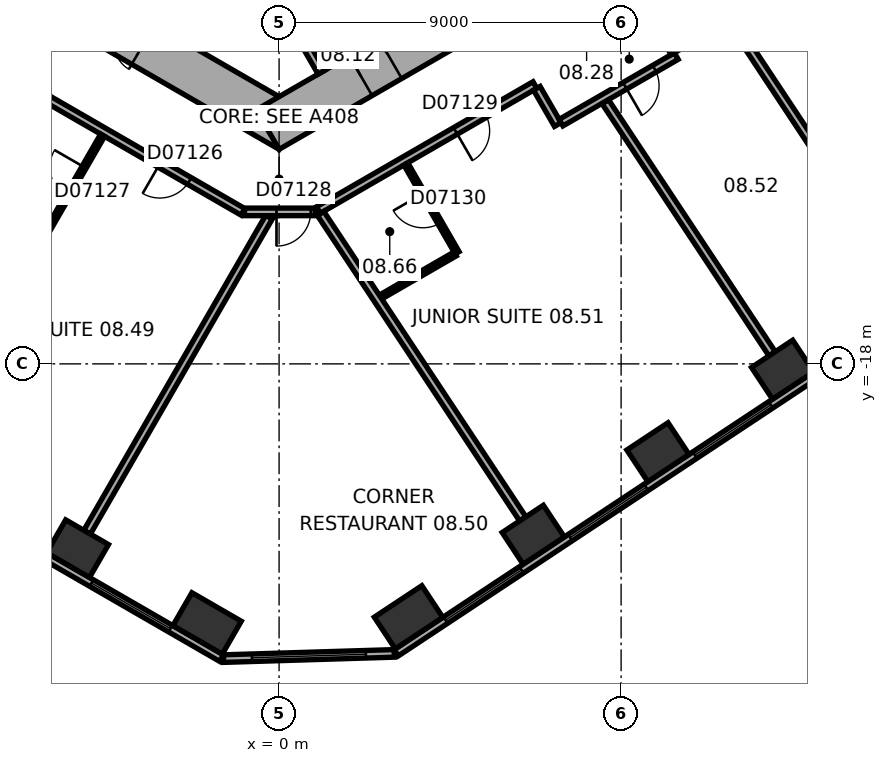
"""IFC4 building model, lengths in metres.
Left out: names, types, materials, properties, quantities, classifications, styles, units other than length and angle.
Written with IfcOpenShell. Run it as: python <this file> out.ifc"""

import sys

from ifc_helpers import new_model, si_unit, direction, frame, frame_2d, origin, origin_2d, place, context, subcontext, project, spatial, rectangle, extrude, element, fill, save


model = new_model("IFC4")
c1 = context("Model", 3, precision=1e-05, world=origin(), true_north=direction((0.0, 1.0)))
c2 = subcontext(c1, "Body", "Model", "MODEL_VIEW")
j1 = project(units=[si_unit("LENGTHUNIT", "METRE"), si_unit("PLANEANGLEUNIT", "RADIAN")], contexts=[c1])
p1 = place(None, origin())
s1 = spatial("IfcSite", under=j1, at=p1, CompositionType="ELEMENT")
p2 = place(p1, origin())
s2 = spatial("IfcBuilding", under=s1, at=p2, CompositionType="ELEMENT")
p3 = place(p2, frame((0.0, 0.0, 47.3)))
s3 = spatial("IfcBuildingStorey", under=s2, at=p3, CompositionType="ELEMENT", Elevation=47.3)
p4 = place(p3, frame((-5.302, -22.862, 0.0), z_axis=(0.0, 0.0, 1.0), x_axis=(0.866025403784, -0.5, 0.0)))
e1 = element("IfcColumn", 1, at=p4, inside=s3, PredefinedType="COLUMN", context=c2, shape_type="SweptSolid", body=[
    extrude(rectangle(XDim=1.3, YDim=1.0, at=origin_2d()), origin(), (0.0, 0.0, 1.0), 3.3),
])
for number, where, z_axis, x_axis in (
    (2, (-1.895, -24.829, 0.0), (0.0, 0.0, 1.0), (0.866, -0.5, 0.0)),
    (3, (3.407, -24.667, 0.0), (0.0, 0.0, 1.0), (0.834, 0.552, 0.0)),
):
    element("IfcColumn", number, at=place(p3, frame(where, z_axis=z_axis, x_axis=x_axis)), inside=s3, PredefinedType="COLUMN", context=c2, shape_type="SweptSolid", body=[
        extrude(rectangle(XDim=1.5, YDim=1.0, at=origin_2d()), origin(), (0.0, 0.0, 1.0), 3.3),
    ])
for number, where, z_axis, x_axis in (
    (4, (6.688, -22.496, 0.0), (0.0, 0.0, 1.0), (0.834, 0.552, 0.0)),
    (5, (9.969, -20.324, 0.0), (0.0, 0.0, 1.0), (0.834, 0.552, 0.0)),
    (6, (13.25, -18.152, 0.0), (0.0, 0.0, 1.0), (0.834, 0.552, 0.0)),
):
    element("IfcColumn", number, at=place(p3, frame(where, z_axis=z_axis, x_axis=x_axis)), inside=s3, PredefinedType="COLUMN", context=c2, shape_type="SweptSolid", body=[
        extrude(rectangle(XDim=1.3, YDim=1.0, at=origin_2d()), origin(), (0.0, 0.0, 1.0), 3.3),
    ])
p5 = place(p3, frame((-10.4, -5.658, 0.0), z_axis=(0.0, 0.0, 1.0), x_axis=(0.866021384402, -0.500006961711, 0.0)))
e7 = element("IfcWall", 7, at=p5, inside=s3, PredefinedType="SHEAR", context=c2, shape_type="SweptSolid", body=[
    extrude(rectangle(XDim=12.355, YDim=1.2, at=frame_2d((6.178, 0.0))), origin(), (0.0, 0.0, 1.0), 3.3),
])
p6 = place(p5, frame((6.378, 0.0, 0.0)))
e8 = element("IfcOpeningElement", 8, at=p6, cuts=e7, PredefinedType="OPENING", context=c2, shape_type="SweptSolid", body=[
    extrude(rectangle(XDim=1.5, YDim=2.1, at=frame_2d((0.75, 1.05))), frame((0.0, 0.61, 0.0), z_axis=(0.0, -1.0, 0.0), x_axis=(1.0, 0.0, 0.0)), (0.0, 0.0, 1.0), 1.22),
])
p7 = place(p5, frame((3.228, 0.0, 0.0)))
e9 = element("IfcOpeningElement", 9, at=p7, cuts=e7, PredefinedType="OPENING", context=c2, shape_type="SweptSolid", body=[
    extrude(rectangle(XDim=0.9, YDim=2.1, at=frame_2d((0.45, 1.05))), frame((0.0, 0.61, 0.0), z_axis=(0.0, -1.0, 0.0), x_axis=(1.0, 0.0, 0.0)), (0.0, 0.0, 1.0), 1.22),
])
p8 = place(p3, frame((-0.3, -11.836, 0.0), z_axis=(0.0, 0.0, 1.0), x_axis=(0.866021384402, 0.500006961711, 0.0)))
e10 = element("IfcWall", 10, at=p8, inside=s3, PredefinedType="SHEAR", context=c2, shape_type="SweptSolid", body=[
    extrude(rectangle(XDim=12.355, YDim=1.2, at=frame_2d((6.178, 0.0))), origin(), (0.0, 0.0, 1.0), 3.3),
])
p9 = place(p8, frame((2.828, 0.0, 0.0)))
e11 = element("IfcOpeningElement", 11, at=p9, cuts=e10, PredefinedType="OPENING", context=c2, shape_type="SweptSolid", body=[
    extrude(rectangle(XDim=0.9, YDim=2.1, at=frame_2d((0.45, 1.05))), frame((0.0, 0.61, 0.0), z_axis=(0.0, -1.0, 0.0), x_axis=(1.0, 0.0, 0.0)), (0.0, 0.0, 1.0), 1.22),
])
p10 = place(p8, frame((5.428, 0.0, 0.0)))
e12 = element("IfcOpeningElement", 12, at=p10, cuts=e10, PredefinedType="OPENING", context=c2, shape_type="SweptSolid", body=[
    extrude(rectangle(XDim=0.9, YDim=2.1, at=frame_2d((0.45, 1.05))), frame((0.0, 0.61, 0.0), z_axis=(0.0, -1.0, 0.0), x_axis=(1.0, 0.0, 0.0)), (0.0, 0.0, 1.0), 1.22),
])
p11 = place(p8, frame((7.928, 0.0, 0.0)))
e13 = element("IfcOpeningElement", 13, at=p11, cuts=e10, PredefinedType="OPENING", context=c2, shape_type="SweptSolid", body=[
    extrude(rectangle(XDim=1.1, YDim=2.1, at=frame_2d((0.55, 1.05))), frame((0.0, 0.61, 0.0), z_axis=(0.0, -1.0, 0.0), x_axis=(1.0, 0.0, 0.0)), (0.0, 0.0, 1.0), 1.22),
])
p12 = place(p3, frame((-19.914, -15.119, 0.0), z_axis=(0.0, 0.0, 1.0), x_axis=(0.866025418898, -0.499999973822, 0.0)))
e14 = element("IfcWall", 14, at=p12, inside=s3, PredefinedType="STANDARD", context=c2, shape_type="SweptSolid", body=[
    extrude(rectangle(XDim=21.246, YDim=0.2, at=frame_2d((10.623, 0.0))), origin(), (0.0, 0.0, 1.0), 3.3),
])
p13 = place(p12, frame((1.555, 0.0, 0.8)))
e15 = element("IfcOpeningElement", 15, at=p13, cuts=e14, PredefinedType="OPENING", context=c2, shape_type="SweptSolid", body=[
    extrude(rectangle(XDim=2.4, YDim=1.7, at=frame_2d((1.2, 0.85))), frame((0.0, 0.11, 0.0), z_axis=(0.0, -1.0, 0.0), x_axis=(1.0, 0.0, 0.0)), (0.0, 0.0, 1.0), 0.22),
])
p14 = place(p12, frame((5.489, 0.0, 0.8)))
e16 = element("IfcOpeningElement", 16, at=p14, cuts=e14, PredefinedType="OPENING", context=c2, shape_type="SweptSolid", body=[
    extrude(rectangle(XDim=2.4, YDim=1.7, at=frame_2d((1.2, 0.85))), frame((0.0, 0.11, 0.0), z_axis=(0.0, -1.0, 0.0), x_axis=(1.0, 0.0, 0.0)), (0.0, 0.0, 1.0), 0.22),
])
p15 = place(p12, frame((9.424, 0.0, 0.8)))
e17 = element("IfcOpeningElement", 17, at=p15, cuts=e14, PredefinedType="OPENING", context=c2, shape_type="SweptSolid", body=[
    extrude(rectangle(XDim=2.4, YDim=1.7, at=frame_2d((1.2, 0.85))), frame((0.0, 0.11, 0.0), z_axis=(0.0, -1.0, 0.0), x_axis=(1.0, 0.0, 0.0)), (0.0, 0.0, 1.0), 0.22),
])
p16 = place(p12, frame((13.358, 0.0, 0.8)))
e18 = element("IfcOpeningElement", 18, at=p16, cuts=e14, PredefinedType="OPENING", context=c2, shape_type="SweptSolid", body=[
    extrude(rectangle(XDim=2.4, YDim=1.7, at=frame_2d((1.2, 0.85))), frame((0.0, 0.11, 0.0), z_axis=(0.0, -1.0, 0.0), x_axis=(1.0, 0.0, 0.0)), (0.0, 0.0, 1.0), 0.22),
])
p17 = place(p12, frame((17.293, 0.0, 0.8)))
e19 = element("IfcOpeningElement", 19, at=p17, cuts=e14, PredefinedType="OPENING", context=c2, shape_type="SweptSolid", body=[
    extrude(rectangle(XDim=2.4, YDim=1.7, at=frame_2d((1.2, 0.85))), frame((0.0, 0.11, 0.0), z_axis=(0.0, -1.0, 0.0), x_axis=(1.0, 0.0, 0.0)), (0.0, 0.0, 1.0), 0.22),
])
p18 = place(p3, frame((-1.461, -25.755, 0.0), z_axis=(0.0, 0.0, 1.0), x_axis=(0.999533823446, 0.030530898895, 0.0)))
e20 = element("IfcWall", 20, at=p18, inside=s3, PredefinedType="STANDARD", context=c2, shape_type="SweptSolid", body=[
    extrude(rectangle(XDim=4.494, YDim=0.2, at=frame_2d((2.247, 0.0))), origin(), (0.0, 0.0, 1.0), 3.3),
])
p19 = place(p18, frame((0.747, 0.0, 0.8)))
e21 = element("IfcOpeningElement", 21, at=p19, cuts=e20, PredefinedType="OPENING", context=c2, shape_type="SweptSolid", body=[
    extrude(rectangle(XDim=3.0, YDim=1.7, at=frame_2d((1.5, 0.85))), frame((0.0, 0.11, 0.0), z_axis=(0.0, -1.0, 0.0), x_axis=(1.0, 0.0, 0.0)), (0.0, 0.0, 1.0), 0.22),
])
p20 = place(p3, frame((3.083, -25.601, 0.0), z_axis=(0.0, 0.0, 1.0), x_axis=(0.833884295743, 0.551939291329, 0.0)))
e22 = element("IfcWall", 22, at=p20, inside=s3, PredefinedType="STANDARD", context=c2, shape_type="SweptSolid", body=[
    extrude(rectangle(XDim=21.246, YDim=0.2, at=frame_2d((10.623, 0.0))), origin(), (0.0, 0.0, 1.0), 3.3),
])
p21 = place(p20, frame((1.553, 0.0, 0.8)))
e23 = element("IfcOpeningElement", 23, at=p21, cuts=e22, PredefinedType="OPENING", context=c2, shape_type="SweptSolid", body=[
    extrude(rectangle(XDim=2.4, YDim=1.7, at=frame_2d((1.2, 0.85))), frame((0.0, 0.11, 0.0), z_axis=(0.0, -1.0, 0.0), x_axis=(1.0, 0.0, 0.0)), (0.0, 0.0, 1.0), 0.22),
])
p22 = place(p20, frame((5.488, 0.0, 0.8)))
e24 = element("IfcOpeningElement", 24, at=p22, cuts=e22, PredefinedType="OPENING", context=c2, shape_type="SweptSolid", body=[
    extrude(rectangle(XDim=2.4, YDim=1.7, at=frame_2d((1.2, 0.85))), frame((0.0, 0.11, 0.0), z_axis=(0.0, -1.0, 0.0), x_axis=(1.0, 0.0, 0.0)), (0.0, 0.0, 1.0), 0.22),
])
p23 = place(p20, frame((9.422, 0.0, 0.8)))
e25 = element("IfcOpeningElement", 25, at=p23, cuts=e22, PredefinedType="OPENING", context=c2, shape_type="SweptSolid", body=[
    extrude(rectangle(XDim=2.4, YDim=1.7, at=frame_2d((1.2, 0.85))), frame((0.0, 0.11, 0.0), z_axis=(0.0, -1.0, 0.0), x_axis=(1.0, 0.0, 0.0)), (0.0, 0.0, 1.0), 0.22),
])
p24 = place(p20, frame((13.357, 0.0, 0.8)))
e26 = element("IfcOpeningElement", 26, at=p24, cuts=e22, PredefinedType="OPENING", context=c2, shape_type="SweptSolid", body=[
    extrude(rectangle(XDim=2.4, YDim=1.7, at=frame_2d((1.2, 0.85))), frame((0.0, 0.11, 0.0), z_axis=(0.0, -1.0, 0.0), x_axis=(1.0, 0.0, 0.0)), (0.0, 0.0, 1.0), 0.22),
])
p25 = place(p20, frame((17.291, 0.0, 0.8)))
e27 = element("IfcOpeningElement", 27, at=p25, cuts=e22, PredefinedType="OPENING", context=c2, shape_type="SweptSolid", body=[
    extrude(rectangle(XDim=2.4, YDim=1.7, at=frame_2d((1.2, 0.85))), frame((0.0, 0.11, 0.0), z_axis=(0.0, -1.0, 0.0), x_axis=(1.0, 0.0, 0.0)), (0.0, 0.0, 1.0), 0.22),
])
p26 = place(p3, frame((0.013, -8.422, 0.0), z_axis=(0.0, 0.0, 1.0), x_axis=(0.500077893725, -0.86598042715, 0.0)))
e28 = element("IfcWall", 28, at=p26, inside=s3, PredefinedType="PARTITIONING", context=c2, shape_type="SweptSolid", body=[
    extrude(rectangle(XDim=2.2, YDim=0.2, at=frame_2d((1.1, 0.0))), origin(), (0.0, 0.0, 1.0), 3.05),
])
p27 = place(p3, frame((-11.615, -7.843, 0.0), z_axis=(0.0, 0.0, 1.0), x_axis=(0.866026466995, -0.499998158461, 0.0)))
e29 = element("IfcWall", 29, at=p27, inside=s3, PredefinedType="PARTITIONING", context=c2, shape_type="SweptSolid", body=[
    extrude(rectangle(XDim=12.315, YDim=0.2, at=frame_2d((6.158, 0.0))), origin(), (0.0, 0.0, 1.0), 3.05),
])
p28 = place(p27, frame((1.665, 0.0, 0.0)))
e30 = element("IfcOpeningElement", 30, at=p28, cuts=e29, PredefinedType="OPENING", context=c2, shape_type="SweptSolid", body=[
    extrude(rectangle(XDim=0.9, YDim=2.1, at=frame_2d((0.45, 1.05))), frame((0.0, 0.11, 0.0), z_axis=(0.0, -1.0, 0.0), x_axis=(1.0, 0.0, 0.0)), (0.0, 0.0, 1.0), 0.22),
])
p29 = place(p27, frame((9.787, 0.0, 0.0)))
e31 = element("IfcOpeningElement", 31, at=p29, cuts=e29, PredefinedType="OPENING", context=c2, shape_type="SweptSolid", body=[
    extrude(rectangle(XDim=0.9, YDim=2.1, at=frame_2d((0.45, 1.05))), frame((0.0, 0.11, 0.0), z_axis=(0.0, -1.0, 0.0), x_axis=(1.0, 0.0, 0.0)), (0.0, 0.0, 1.0), 0.22),
])
p30 = place(p3, frame((-5.052, -22.429, 0.0), z_axis=(0.0, 0.0, 1.0), x_axis=(0.500004329283, 0.866022904257, 0.0)))
e32 = element("IfcWall", 32, at=p30, inside=s3, PredefinedType="PARTITIONING", context=c2, shape_type="SweptSolid", body=[
    extrude(rectangle(XDim=9.572, YDim=0.2, at=frame_2d((4.786, 0.0))), origin(), (0.0, 0.0, 1.0), 3.05),
])
p31 = place(p3, frame((-4.644, -11.983, 0.0), z_axis=(0.0, 0.0, 1.0), x_axis=(-0.499985389037, -0.866033839264, 0.0)))
e33 = element("IfcWall", 33, at=p31, inside=s3, PredefinedType="PARTITIONING", context=c2, shape_type="SweptSolid", body=[
    extrude(rectangle(XDim=2.84, YDim=0.12, at=frame_2d((1.42, 0.0))), origin(), (0.0, 0.0, 1.0), 3.05),
])
p32 = place(p31, frame((0.97, 0.0, 0.0)))
e34 = element("IfcOpeningElement", 34, at=p32, cuts=e33, PredefinedType="OPENING", context=c2, shape_type="SweptSolid", body=[
    extrude(rectangle(XDim=0.9, YDim=2.1, at=frame_2d((0.45, 1.05))), frame((0.0, 0.07, 0.0), z_axis=(0.0, -1.0, 0.0), x_axis=(1.0, 0.0, 0.0)), (0.0, 0.0, 1.0), 0.14),
])
p33 = place(p3, frame((-0.91, -14.001, 0.0), z_axis=(0.0, 0.0, 1.0), x_axis=(1.0, 0.0, 0.0)))
e35 = element("IfcWall", 35, at=p33, inside=s3, PredefinedType="PARTITIONING", context=c2, shape_type="SweptSolid", body=[
    extrude(rectangle(XDim=1.86, YDim=0.2, at=frame_2d((0.93, 0.0))), origin(), (0.0, 0.0, 1.0), 3.05),
])
p34 = place(p33, frame((0.842, 0.0, 0.0)))
e36 = element("IfcOpeningElement", 36, at=p34, cuts=e35, PredefinedType="OPENING", context=c2, shape_type="SweptSolid", body=[
    extrude(rectangle(XDim=0.9, YDim=2.1, at=frame_2d((0.45, 1.05))), frame((0.0, 0.11, 0.0), z_axis=(0.0, -1.0, 0.0), x_axis=(1.0, 0.0, 0.0)), (0.0, 0.0, 1.0), 0.22),
])
p35 = place(p3, frame((1.033, -13.953, 0.0), z_axis=(0.0, 0.0, 1.0), x_axis=(0.866017531406, 0.500013635111, 0.0)))
e37 = element("IfcWall", 37, at=p35, inside=s3, PredefinedType="PARTITIONING", context=c2, shape_type="SweptSolid", body=[
    extrude(rectangle(XDim=6.58, YDim=0.2, at=frame_2d((3.29, 0.0))), origin(), (0.0, 0.0, 1.0), 3.05),
])
p36 = place(p35, frame((4.165, 0.0, 0.0)))
e38 = element("IfcOpeningElement", 38, at=p36, cuts=e37, PredefinedType="OPENING", context=c2, shape_type="SweptSolid", body=[
    extrude(rectangle(XDim=0.9, YDim=2.1, at=frame_2d((0.45, 1.05))), frame((0.0, 0.11, 0.0), z_axis=(0.0, -1.0, 0.0), x_axis=(1.0, 0.0, 0.0)), (0.0, 0.0, 1.0), 0.22),
])
p37 = place(p3, frame((3.335, -12.739, 0.0), z_axis=(0.0, 0.0, 1.0), x_axis=(0.499980770555, -0.866036505625, 0.0)))
e39 = element("IfcWall", 39, at=p37, inside=s3, PredefinedType="PARTITIONING", context=c2, shape_type="SweptSolid", body=[
    extrude(rectangle(XDim=2.7, YDim=0.12, at=frame_2d((1.35, 0.0))), origin(), (0.0, 0.0, 1.0), 3.05),
])
p38 = place(p37, frame((0.9, 0.0, 0.0)))
e40 = element("IfcOpeningElement", 40, at=p38, cuts=e39, PredefinedType="OPENING", context=c2, shape_type="SweptSolid", body=[
    extrude(rectangle(XDim=0.9, YDim=2.1, at=frame_2d((0.45, 1.05))), frame((0.0, 0.07, 0.0), z_axis=(0.0, -1.0, 0.0), x_axis=(1.0, 0.0, 0.0)), (0.0, 0.0, 1.0), 0.14),
])
p39 = place(p3, frame((4.633, -15.107, 0.0), z_axis=(0.0, 0.0, 1.0), x_axis=(-0.866022496617, -0.500005035328, 0.0)))
e41 = element("IfcWall", 41, at=p39, inside=s3, PredefinedType="PARTITIONING", context=c2, shape_type="SweptSolid", body=[
    extrude(rectangle(XDim=2.269, YDim=0.12, at=frame_2d((1.134, 0.0))), origin(), (0.0, 0.0, 1.0), 3.05),
])
p40 = place(p3, frame((6.412, -22.079, 0.0), z_axis=(0.0, 0.0, 1.0), x_axis=(-0.551919507115, 0.83389739037, 0.0)))
e42 = element("IfcWall", 42, at=p40, inside=s3, PredefinedType="PARTITIONING", context=c2, shape_type="SweptSolid", body=[
    extrude(rectangle(XDim=9.635, YDim=0.2, at=frame_2d((4.817, 0.0))), origin(), (0.0, 0.0, 1.0), 3.05),
])
p41 = place(p3, frame((6.782, -10.749, 0.0), z_axis=(0.0, 0.0, 1.0), x_axis=(0.500074377092, -0.865982457891, 0.0)))
e43 = element("IfcWall", 43, at=p41, inside=s3, PredefinedType="PARTITIONING", context=c2, shape_type="SweptSolid", body=[
    extrude(rectangle(XDim=1.101, YDim=0.2, at=frame_2d((0.55, 0.0))), origin(), (0.0, 0.0, 1.0), 3.05),
])
p42 = place(p3, frame((7.419, -11.653, 0.0), z_axis=(0.0, 0.0, 1.0), x_axis=(0.866038154057, 0.49997791523, 0.0)))
e44 = element("IfcWall", 44, at=p42, inside=s3, PredefinedType="PARTITIONING", context=c2, shape_type="SweptSolid", body=[
    extrude(rectangle(XDim=3.502, YDim=0.2, at=frame_2d((1.751, 0.0))), origin(), (0.0, 0.0, 1.0), 3.05),
])
p43 = place(p42, frame((1.94, 0.0, 0.0)))
e45 = element("IfcOpeningElement", 45, at=p43, cuts=e44, PredefinedType="OPENING", context=c2, shape_type="SweptSolid", body=[
    extrude(rectangle(XDim=0.9, YDim=2.1, at=frame_2d((0.45, 1.05))), frame((0.0, 0.11, 0.0), z_axis=(0.0, -1.0, 0.0), x_axis=(1.0, 0.0, 0.0)), (0.0, 0.0, 1.0), 0.22),
])
p44 = place(p3, frame((10.402, -9.815, 0.0), z_axis=(0.0, 0.0, 1.0), x_axis=(-0.499968756647, 0.866043441391, 0.0)))
e46 = element("IfcWall", 46, at=p44, inside=s3, PredefinedType="PARTITIONING", context=c2, shape_type="SweptSolid", body=[
    extrude(rectangle(XDim=1.001, YDim=0.2, at=frame_2d((0.5, 0.0))), origin(), (0.0, 0.0, 1.0), 3.05),
])
p45 = place(p3, frame((12.974, -17.735, 0.0), z_axis=(0.0, 0.0, 1.0), x_axis=(-0.55192625685, 0.833892922982, 0.0)))
e47 = element("IfcWall", 47, at=p45, inside=s3, PredefinedType="PARTITIONING", context=c2, shape_type="SweptSolid", body=[
    extrude(rectangle(XDim=7.95, YDim=0.2, at=frame_2d((3.975, 0.0))), origin(), (0.0, 0.0, 1.0), 3.05),
])
p46 = place(p3, frame((16.255, -15.564, 0.0), z_axis=(0.0, 0.0, 1.0), x_axis=(-0.55192208744, 0.833895682562, 0.0)))
e48 = element("IfcWall", 48, at=p46, inside=s3, PredefinedType="PARTITIONING", context=c2, shape_type="SweptSolid", body=[
    extrude(rectangle(XDim=8.913, YDim=0.2, at=frame_2d((4.457, 0.0))), origin(), (0.0, 0.0, 1.0), 2.6),
])
p47 = place(p17, origin())
e49 = element("IfcWindow", 49, at=p47, inside=s3, PartitioningType="SINGLE_PANEL", PredefinedType="WINDOW", context=c2, shape_type="SweptSolid", body=[
    extrude(rectangle(XDim=2.4, YDim=1.7, at=frame_2d((1.2, 0.85))), frame((0.0, 0.03, 0.0), z_axis=(0.0, -1.0, 0.0), x_axis=(1.0, 0.0, 0.0)), (0.0, 0.0, 1.0), 0.06),
])
fill(e19, e49)
p48 = place(p19, origin())
e50 = element("IfcWindow", 50, at=p48, inside=s3, PartitioningType="SINGLE_PANEL", PredefinedType="WINDOW", context=c2, shape_type="SweptSolid", body=[
    extrude(rectangle(XDim=3.0, YDim=1.7, at=frame_2d((1.5, 0.85))), frame((0.0, 0.03, 0.0), z_axis=(0.0, -1.0, 0.0), x_axis=(1.0, 0.0, 0.0)), (0.0, 0.0, 1.0), 0.06),
])
fill(e21, e50)
p49 = place(p21, origin())
e51 = element("IfcWindow", 51, at=p49, inside=s3, PartitioningType="SINGLE_PANEL", PredefinedType="WINDOW", context=c2, shape_type="SweptSolid", body=[
    extrude(rectangle(XDim=2.4, YDim=1.7, at=frame_2d((1.2, 0.85))), frame((0.0, 0.03, 0.0), z_axis=(0.0, -1.0, 0.0), x_axis=(1.0, 0.0, 0.0)), (0.0, 0.0, 1.0), 0.06),
])
fill(e23, e51)
p50 = place(p22, origin())
e52 = element("IfcWindow", 52, at=p50, inside=s3, PartitioningType="SINGLE_PANEL", PredefinedType="WINDOW", context=c2, shape_type="SweptSolid", body=[
    extrude(rectangle(XDim=2.4, YDim=1.7, at=frame_2d((1.2, 0.85))), frame((0.0, 0.03, 0.0), z_axis=(0.0, -1.0, 0.0), x_axis=(1.0, 0.0, 0.0)), (0.0, 0.0, 1.0), 0.06),
])
fill(e24, e52)
p51 = place(p23, origin())
e53 = element("IfcWindow", 53, at=p51, inside=s3, PartitioningType="SINGLE_PANEL", PredefinedType="WINDOW", context=c2, shape_type="SweptSolid", body=[
    extrude(rectangle(XDim=2.4, YDim=1.7, at=frame_2d((1.2, 0.85))), frame((0.0, 0.03, 0.0), z_axis=(0.0, -1.0, 0.0), x_axis=(1.0, 0.0, 0.0)), (0.0, 0.0, 1.0), 0.06),
])
fill(e25, e53)
p52 = place(p9, origin())
e54 = element("IfcDoor", 54, at=p52, inside=s3, OperationType="SINGLE_SWING_LEFT", PredefinedType="DOOR", context=c2, shape_type="SweptSolid", body=[
    extrude(rectangle(XDim=0.9, YDim=2.1, at=frame_2d((0.45, 1.05))), frame((0.0, 0.025, 0.0), z_axis=(0.0, -1.0, 0.0), x_axis=(1.0, 0.0, 0.0)), (0.0, 0.0, 1.0), 0.05),
])
fill(e11, e54)
p53 = place(p29, origin())
e55 = element("IfcDoor", 55, at=p53, inside=s3, OperationType="SINGLE_SWING_LEFT", PredefinedType="DOOR", context=c2, shape_type="SweptSolid", body=[
    extrude(rectangle(XDim=0.9, YDim=2.1, at=frame_2d((0.45, 1.05))), frame((0.0, 0.025, 0.0), z_axis=(0.0, -1.0, 0.0), x_axis=(1.0, 0.0, 0.0)), (0.0, 0.0, 1.0), 0.05),
])
fill(e31, e55)
p54 = place(p32, origin())
e56 = element("IfcDoor", 56, at=p54, inside=s3, OperationType="SINGLE_SWING_LEFT", PredefinedType="DOOR", context=c2, shape_type="SweptSolid", body=[
    extrude(rectangle(XDim=0.9, YDim=2.1, at=frame_2d((0.45, 1.05))), frame((0.0, 0.025, 0.0), z_axis=(0.0, -1.0, 0.0), x_axis=(1.0, 0.0, 0.0)), (0.0, 0.0, 1.0), 0.05),
])
fill(e34, e56)
p55 = place(p34, origin())
e57 = element("IfcDoor", 57, at=p55, inside=s3, OperationType="SINGLE_SWING_LEFT", PredefinedType="DOOR", context=c2, shape_type="SweptSolid", body=[
    extrude(rectangle(XDim=0.9, YDim=2.1, at=frame_2d((0.45, 1.05))), frame((0.0, 0.025, 0.0), z_axis=(0.0, -1.0, 0.0), x_axis=(1.0, 0.0, 0.0)), (0.0, 0.0, 1.0), 0.05),
])
fill(e36, e57)
p56 = place(p36, origin())
e58 = element("IfcDoor", 58, at=p56, inside=s3, OperationType="SINGLE_SWING_LEFT", PredefinedType="DOOR", context=c2, shape_type="SweptSolid", body=[
    extrude(rectangle(XDim=0.9, YDim=2.1, at=frame_2d((0.45, 1.05))), frame((0.0, 0.025, 0.0), z_axis=(0.0, -1.0, 0.0), x_axis=(1.0, 0.0, 0.0)), (0.0, 0.0, 1.0), 0.05),
])
fill(e38, e58)
p57 = place(p38, origin())
e59 = element("IfcDoor", 59, at=p57, inside=s3, OperationType="SINGLE_SWING_LEFT", PredefinedType="DOOR", context=c2, shape_type="SweptSolid", body=[
    extrude(rectangle(XDim=0.9, YDim=2.1, at=frame_2d((0.45, 1.05))), frame((0.0, 0.025, 0.0), z_axis=(0.0, -1.0, 0.0), x_axis=(1.0, 0.0, 0.0)), (0.0, 0.0, 1.0), 0.05),
])
fill(e40, e59)
p58 = place(p43, origin())
e60 = element("IfcDoor", 60, at=p58, inside=s3, OperationType="SINGLE_SWING_LEFT", PredefinedType="DOOR", context=c2, shape_type="SweptSolid", body=[
    extrude(rectangle(XDim=0.9, YDim=2.1, at=frame_2d((0.45, 1.05))), frame((0.0, 0.025, 0.0), z_axis=(0.0, -1.0, 0.0), x_axis=(1.0, 0.0, 0.0)), (0.0, 0.0, 1.0), 0.05),
])
fill(e45, e60)
save(model, sys.argv[1])
